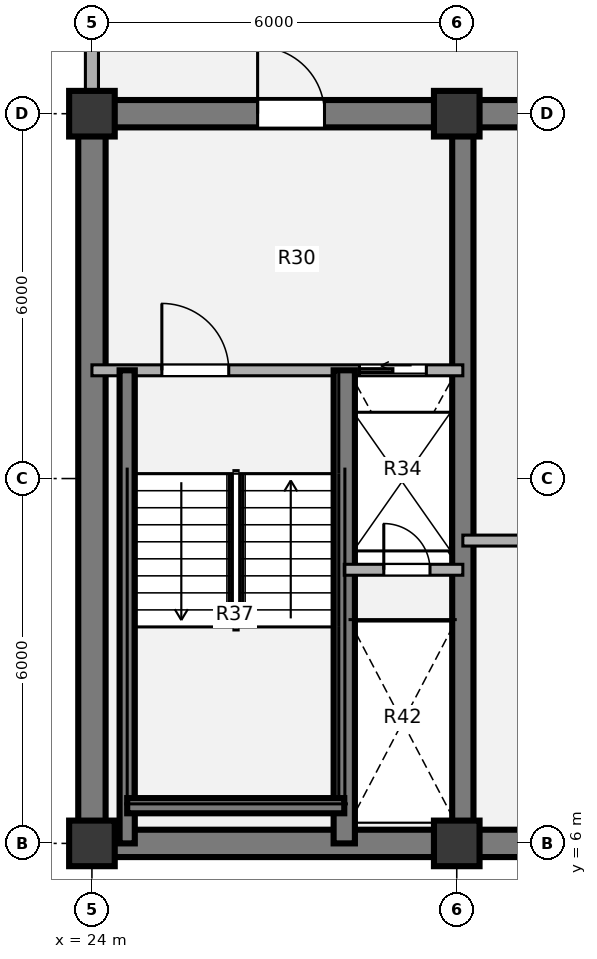
"""IFC4 building model, lengths in metres.
Left out: names, types, materials, properties, quantities, classifications, styles, units other than length and angle.
Written with IfcOpenShell. Run it as: python <this file> out.ifc"""

import sys

from ifc_helpers import new_model, si_unit, direction, frame, frame_2d, origin, origin_2d, place, context, subcontext, project, spatial, rectangle, extrude, source, transform, mapped, element, fill, save


model = new_model("IFC4")
c1 = context("Model", 3, precision=1e-05, world=origin(), true_north=direction((0.0, 1.0)))
c2 = subcontext(c1, "Body", "Model", "MODEL_VIEW")
j1 = project(units=[si_unit("LENGTHUNIT", "METRE"), si_unit("PLANEANGLEUNIT", "RADIAN")], contexts=[c1])
p1 = place(None, origin())
s1 = spatial("IfcSite", under=j1, at=p1, CompositionType="ELEMENT")
p2 = place(p1, origin())
s2 = spatial("IfcBuilding", under=s1, at=p2, CompositionType="ELEMENT")
p3 = place(p2, frame((0.0, 0.0, 201.78)))
s3 = spatial("IfcBuildingStorey", under=s2, at=p3, CompositionType="ELEMENT", Elevation=201.78)
m1 = source(origin(), c2, "Body", "SweptSolid", [
    extrude(rectangle(XDim=0.75, YDim=0.75, at=origin_2d()), origin(), (0.0, 0.0, 1.0), 3.78),
])
for number, where, z_axis, x_axis in (
    (1, (24.0, 6.0, 0.0), (0.0, 0.0, 1.0), (1.0, 0.0, 0.0)),
    (2, (30.0, 6.0, 0.0), (0.0, 0.0, 1.0), (1.0, 0.0, 0.0)),
    (3, (24.0, 18.0, 0.0), (0.0, 0.0, 1.0), (1.0, 0.0, 0.0)),
    (4, (30.0, 18.0, 0.0), (0.0, 0.0, 1.0), (1.0, 0.0, 0.0)),
):
    element("IfcColumn", number, at=place(p3, frame(where, z_axis=z_axis, x_axis=x_axis)), inside=s3, PredefinedType="COLUMN", context=c2, shape_type="MappedRepresentation", body=[
        mapped(m1, transform((0.0, 0.0, 0.0), x_axis=(1.0, 0.0, 0.0), y_axis=(0.0, 1.0, 0.0), z_axis=(0.0, 0.0, 1.0), scale=1.0)),
    ])
p4 = place(p3, frame((48.225, 6.0, 0.0), z_axis=(0.0, 0.0, 1.0), x_axis=(-1.0, 0.0, 0.0)))
e5 = element("IfcWall", 5, at=p4, inside=s3, PredefinedType="SHEAR", context=c2, shape_type="SweptSolid", body=[
    extrude(rectangle(XDim=24.45, YDim=0.45, at=frame_2d((12.225, 0.0))), origin(), (0.0, 0.0, 1.0), 3.78),
])
p5 = place(p3, frame((24.0, 6.0, 0.0), z_axis=(0.0, 0.0, 1.0), x_axis=(0.0, 1.0, 0.0)))
e6 = element("IfcWall", 6, at=p5, inside=s3, PredefinedType="SHEAR", context=c2, shape_type="SweptSolid", body=[
    extrude(rectangle(XDim=12.0, YDim=0.45, at=frame_2d((6.0, 0.0))), origin(), (0.0, 0.0, 1.0), 3.78),
])
p6 = place(p3, frame((23.775, 18.0, 0.0), z_axis=(0.0, 0.0, 1.0), x_axis=(1.0, 0.0, 0.0)))
e7 = element("IfcWall", 7, at=p6, inside=s3, PredefinedType="SHEAR", context=c2, shape_type="SweptSolid", body=[
    extrude(rectangle(XDim=9.425, YDim=0.45, at=frame_2d((4.712, 0.0))), origin(), (0.0, 0.0, 1.0), 3.78),
])
p7 = place(p6, frame((2.95, 0.0, 0.0)))
e8 = element("IfcOpeningElement", 8, at=p7, cuts=e7, PredefinedType="OPENING", context=c2, shape_type="SweptSolid", body=[
    extrude(rectangle(XDim=1.1, YDim=2.1, at=origin_2d()), frame((0.55, 0.235, 1.05), z_axis=(0.0, -1.0, 0.0), x_axis=(1.0, 0.0, 0.0)), (0.0, 0.0, 1.0), 0.47),
])
p8 = place(p3, frame((30.1, 6.0, 0.0), z_axis=(0.0, 0.0, 1.0), x_axis=(0.0, 1.0, 0.0)))
e9 = element("IfcWall", 9, at=p8, inside=s3, PredefinedType="SHEAR", context=c2, shape_type="SweptSolid", body=[
    extrude(rectangle(XDim=12.0, YDim=0.35, at=frame_2d((6.0, 0.0))), origin(), (0.0, 0.0, 1.0), 3.78),
])
p9 = place(p3, frame((24.0, 18.355, 0.0), z_axis=(0.0, 0.0, 1.0), x_axis=(0.0, 1.0, 0.0)))
e10 = element("IfcWall", 10, at=p9, inside=s3, PredefinedType="SOLIDWALL", context=c2, shape_type="SweptSolid", body=[
    extrude(rectangle(XDim=2.695, YDim=0.215, at=frame_2d((1.348, 0.0))), origin(), (0.0, 0.0, 1.0), 2.718),
])
p10 = place(p3, frame((30.1, 10.98, 0.0), z_axis=(0.0, 0.0, 1.0), x_axis=(1.0, 0.0, 0.0)))
e11 = element("IfcWall", 11, at=p10, inside=s3, PredefinedType="PARTITIONING", context=c2, shape_type="SweptSolid", body=[
    extrude(rectangle(XDim=4.08, YDim=0.18, at=frame_2d((2.04, 0.0))), origin(), (0.0, 0.0, 1.0), 3.5),
])
p11 = place(p3, frame((24.0, 13.78, 0.0), z_axis=(0.0, 0.0, 1.0), x_axis=(1.0, 0.0, 0.0)))
e12 = element("IfcWall", 12, at=p11, inside=s3, PredefinedType="PARTITIONING", context=c2, shape_type="SweptSolid", body=[
    extrude(rectangle(XDim=6.1, YDim=0.18, at=frame_2d((3.05, 0.0))), origin(), (0.0, 0.0, 1.0), 3.5),
])
p12 = place(p11, frame((1.15, 0.0, 0.0)))
e13 = element("IfcOpeningElement", 13, at=p12, cuts=e12, PredefinedType="OPENING", context=c2, shape_type="SweptSolid", body=[
    extrude(rectangle(XDim=1.1, YDim=2.1, at=origin_2d()), frame((0.55, 0.1, 1.05), z_axis=(0.0, -1.0, 0.0), x_axis=(1.0, 0.0, 0.0)), (0.0, 0.0, 1.0), 0.2),
])
p13 = place(p11, frame((4.4, 0.0, 0.0)))
e14 = element("IfcOpeningElement", 14, at=p13, cuts=e12, PredefinedType="OPENING", context=c2, shape_type="SweptSolid", body=[
    extrude(rectangle(XDim=1.1, YDim=2.1, at=origin_2d()), frame((0.55, 0.1, 1.05), z_axis=(0.0, -1.0, 0.0), x_axis=(1.0, 0.0, 0.0)), (0.0, 0.0, 1.0), 0.2),
])
p14 = place(p3, frame((28.15, 6.0, 0.0), z_axis=(0.0, 0.0, 1.0), x_axis=(0.0, 1.0, 0.0)))
e15 = element("IfcWall", 15, at=p14, inside=s3, PredefinedType="SHEAR", context=c2, shape_type="SweptSolid", body=[
    extrude(rectangle(XDim=7.78, YDim=0.35, at=frame_2d((3.89, 0.0))), origin(), (0.0, 0.0, 1.0), 3.85),
])
p15 = place(p3, frame((24.58, 6.0, 0.0), z_axis=(0.0, 0.0, 1.0), x_axis=(0.0, 1.0, 0.0)))
e16 = element("IfcWall", 16, at=p15, inside=s3, PredefinedType="SHEAR", context=c2, shape_type="SweptSolid", body=[
    extrude(rectangle(XDim=7.78, YDim=0.25, at=frame_2d((3.89, 0.0))), origin(), (0.0, 0.0, 1.0), 3.85),
])
p16 = place(p3, frame((24.58, 6.62, 0.0), z_axis=(0.0, 0.0, 1.0), x_axis=(1.0, 0.0, 0.0)))
e17 = element("IfcWall", 17, at=p16, inside=s3, PredefinedType="SHEAR", context=c2, shape_type="SweptSolid", body=[
    extrude(rectangle(XDim=3.57, YDim=0.25, at=frame_2d((1.785, 0.0))), origin(), (0.0, 0.0, 1.0), 3.85),
])
p17 = place(p3, frame((28.15, 10.5, 0.0), z_axis=(0.0, 0.0, 1.0), x_axis=(1.0, 0.0, 0.0)))
e18 = element("IfcWall", 18, at=p17, inside=s3, PredefinedType="PARTITIONING", context=c2, shape_type="SweptSolid", body=[
    extrude(rectangle(XDim=1.95, YDim=0.18, at=frame_2d((0.975, 0.0))), origin(), (0.0, 0.0, 1.0), 3.5),
])
p18 = place(p17, frame((0.65, 0.0, 0.0)))
e19 = element("IfcOpeningElement", 19, at=p18, cuts=e18, PredefinedType="OPENING", context=c2, shape_type="SweptSolid", body=[
    extrude(rectangle(XDim=0.76, YDim=2.05, at=origin_2d()), frame((0.38, 0.1, 1.025), z_axis=(0.0, -1.0, 0.0), x_axis=(1.0, 0.0, 0.0)), (0.0, 0.0, 1.0), 0.2),
])
m2 = source(origin(), c2, "Body", "SweptSolid", [
    extrude(rectangle(XDim=1.1, YDim=2.1, at=origin_2d()), frame((0.55, 0.025, 1.05), z_axis=(0.0, -1.0, 0.0), x_axis=(1.0, 0.0, 0.0)), (0.0, 0.0, 1.0), 0.05),
])
p19 = place(p12, origin())
e20 = element("IfcDoor", 20, at=p19, inside=s3, OperationType="SINGLE_SWING_LEFT", PredefinedType="DOOR", context=c2, shape_type="MappedRepresentation", body=[
    mapped(m2, transform((0.0, 0.0, 0.0), x_axis=(1.0, 0.0, 0.0), y_axis=(0.0, 1.0, 0.0), z_axis=(0.0, 0.0, 1.0), scale=1.0)),
])
fill(e13, e20)
m3 = source(origin(), c2, "Body", "SweptSolid", [
    extrude(rectangle(XDim=1.1, YDim=2.1, at=origin_2d()), frame((0.55, 0.025, 1.05), z_axis=(0.0, -1.0, 0.0), x_axis=(1.0, 0.0, 0.0)), (0.0, 0.0, 1.0), 0.05),
])
p20 = place(p13, origin())
e21 = element("IfcDoor", 21, at=p20, inside=s3, OperationType="SLIDING_TO_LEFT", PredefinedType="DOOR", context=c2, shape_type="MappedRepresentation", body=[
    mapped(m3, transform((0.0, 0.0, 0.0), x_axis=(1.0, 0.0, 0.0), y_axis=(0.0, 1.0, 0.0), z_axis=(0.0, 0.0, 1.0), scale=1.0)),
])
fill(e14, e21)
m4 = source(origin(), c2, "Body", "SweptSolid", [
    extrude(rectangle(XDim=0.76, YDim=2.05, at=origin_2d()), frame((0.38, 0.025, 1.025), z_axis=(0.0, -1.0, 0.0), x_axis=(1.0, 0.0, 0.0)), (0.0, 0.0, 1.0), 0.05),
])
p21 = place(p18, origin())
e22 = element("IfcDoor", 22, at=p21, inside=s3, OperationType="SINGLE_SWING_LEFT", PredefinedType="DOOR", context=c2, shape_type="MappedRepresentation", body=[
    mapped(m4, transform((0.0, 0.0, 0.0), x_axis=(1.0, 0.0, 0.0), y_axis=(0.0, 1.0, 0.0), z_axis=(0.0, 0.0, 1.0), scale=1.0)),
])
fill(e19, e22)
m5 = source(origin(), c2, "Body", "SweptSolid", [
    extrude(rectangle(XDim=1.1, YDim=2.1, at=origin_2d()), frame((0.55, 0.025, 1.05), z_axis=(0.0, -1.0, 0.0), x_axis=(1.0, 0.0, 0.0)), (0.0, 0.0, 1.0), 0.05),
])
p22 = place(p7, origin())
e23 = element("IfcDoor", 23, at=p22, inside=s3, OperationType="SINGLE_SWING_LEFT", PredefinedType="DOOR", context=c2, shape_type="MappedRepresentation", body=[
    mapped(m5, transform((0.0, 0.0, 0.0), x_axis=(1.0, 0.0, 0.0), y_axis=(0.0, 1.0, 0.0), z_axis=(0.0, 0.0, 1.0), scale=1.0)),
])
fill(e8, e23)
save(model, sys.argv[1])
